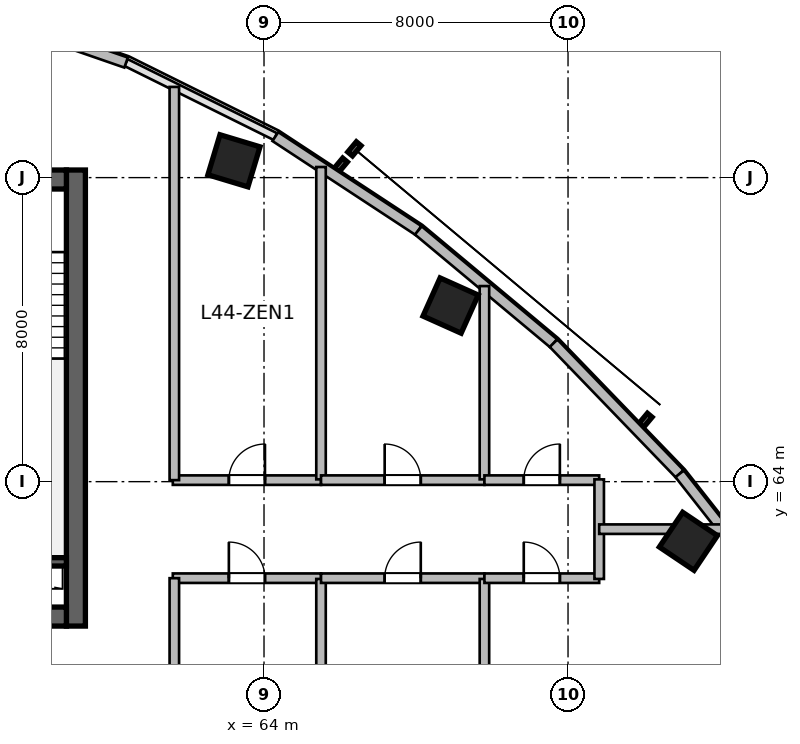
"""IFC4 building model, lengths in metres.
Left out: names, types, materials, properties, quantities, classifications, styles, units other than length and angle.
Written with IfcOpenShell. Run it as: python <this file> out.ifc"""

import sys

from ifc_helpers import new_model, si_unit, direction, frame, frame_2d, origin, origin_2d, place, context, subcontext, project, spatial, rectangle, extrude, source, transform, mapped, element, fill, save


model = new_model("IFC4")
c1 = context("Model", 3, precision=1e-05, world=origin(), true_north=direction((0.0, 1.0)))
c2 = subcontext(c1, "Body", "Model", "MODEL_VIEW")
j1 = project(units=[si_unit("LENGTHUNIT", "METRE"), si_unit("PLANEANGLEUNIT", "RADIAN")], contexts=[c1])
p1 = place(None, origin())
s1 = spatial("IfcSite", under=j1, at=p1, CompositionType="ELEMENT")
p2 = place(p1, origin())
s2 = spatial("IfcBuilding", under=s1, at=p2, CompositionType="ELEMENT")
p3 = place(p2, frame((0.0, 0.0, 181.8)))
s3 = spatial("IfcBuildingStorey", under=s2, at=p3, CompositionType="ELEMENT", Elevation=181.8)
m1 = source(origin(), c2, "Body", "SweptSolid", [
    extrude(rectangle(XDim=12.0, YDim=0.5, at=frame_2d((6.0, 0.0))), origin(), (0.0, 0.0, 1.0), 3.9),
])
p4 = place(p3, frame((59.05, 60.2, 0.0), z_axis=(0.0, 0.0, 1.0), x_axis=(0.0, 1.0, 0.0)))
e1 = element("IfcWall", 1, at=p4, inside=s3, PredefinedType="SHEAR", context=c2, shape_type="MappedRepresentation", body=[
    mapped(m1, transform((0.0, 0.0, 0.0), scale=1.0)),
])
m2 = source(origin(), c2, "Body", "SweptSolid", [
    extrude(rectangle(XDim=21.6, YDim=0.5, at=frame_2d((10.8, 0.0))), origin(), (0.0, 0.0, 1.0), 3.9),
])
p5 = place(p3, frame((37.2, 60.45, 0.0), z_axis=(0.0, 0.0, 1.0), x_axis=(1.0, 0.0, 0.0)))
e2 = element("IfcWall", 2, at=p5, inside=s3, PredefinedType="SHEAR", context=c2, shape_type="MappedRepresentation", body=[
    mapped(m2, transform((0.0, 0.0, 0.0), scale=1.0)),
])
p6 = place(p5, frame((1.1, 0.0, 0.0)))
e3 = element("IfcOpeningElement", 3, at=p6, cuts=e2, PredefinedType="OPENING", context=c2, shape_type="SweptSolid", body=[
    extrude(rectangle(XDim=1.15, YDim=2.15, at=frame_2d((0.575, 1.075))), frame((0.0, 0.26, 0.0), z_axis=(0.0, -1.0, 0.0), x_axis=(1.0, 0.0, 0.0)), (0.0, 0.0, 1.0), 0.52),
])
p7 = place(p5, frame((19.5, 0.0, 0.0)))
e4 = element("IfcOpeningElement", 4, at=p7, cuts=e2, PredefinedType="OPENING", context=c2, shape_type="SweptSolid", body=[
    extrude(rectangle(XDim=0.9, YDim=2.1, at=frame_2d((0.45, 1.05))), frame((0.0, 0.26, 0.0), z_axis=(0.0, -1.0, 0.0), x_axis=(1.0, 0.0, 0.0)), (0.0, 0.0, 1.0), 0.52),
])
p8 = place(p5, frame((12.02, 0.0, 0.0)))
e5 = element("IfcOpeningElement", 5, at=p8, cuts=e2, PredefinedType="OPENING", context=c2, shape_type="SweptSolid", body=[
    extrude(rectangle(XDim=1.6, YDim=2.15, at=frame_2d((0.8, 1.075))), frame((0.0, 0.26, 0.0), z_axis=(0.0, -1.0, 0.0), x_axis=(1.0, 0.0, 0.0)), (0.0, 0.0, 1.0), 0.52),
])
p9 = place(p3, frame((37.2, 71.95, 0.0), z_axis=(0.0, 0.0, 1.0), x_axis=(1.0, 0.0, 0.0)))
e6 = element("IfcWall", 6, at=p9, inside=s3, PredefinedType="SHEAR", context=c2, shape_type="MappedRepresentation", body=[
    mapped(m2, transform((0.0, 0.0, 0.0), scale=1.0)),
])
p10 = place(p9, frame((1.2, 0.0, 0.0)))
e7 = element("IfcOpeningElement", 7, at=p10, cuts=e6, PredefinedType="OPENING", context=c2, shape_type="SweptSolid", body=[
    extrude(rectangle(XDim=0.9, YDim=2.1, at=frame_2d((0.45, 1.05))), frame((0.0, 0.26, 0.0), z_axis=(0.0, -1.0, 0.0), x_axis=(1.0, 0.0, 0.0)), (0.0, 0.0, 1.0), 0.52),
])
p11 = place(p9, frame((14.7, 0.0, 0.0)))
e8 = element("IfcOpeningElement", 8, at=p11, cuts=e6, PredefinedType="OPENING", context=c2, shape_type="SweptSolid", body=[
    extrude(rectangle(XDim=1.2, YDim=2.15, at=frame_2d((0.6, 1.075))), frame((0.0, 0.26, 0.0), z_axis=(0.0, -1.0, 0.0), x_axis=(1.0, 0.0, 0.0)), (0.0, 0.0, 1.0), 0.52),
])
p12 = place(p9, frame((4.15, 0.0, 0.0)))
e9 = element("IfcOpeningElement", 9, at=p12, cuts=e6, PredefinedType="OPENING", context=c2, shape_type="SweptSolid", body=[
    extrude(rectangle(XDim=1.3, YDim=2.15, at=frame_2d((0.65, 1.075))), frame((0.0, 0.26, 0.0), z_axis=(0.0, -1.0, 0.0), x_axis=(1.0, 0.0, 0.0)), (0.0, 0.0, 1.0), 0.52),
])
p13 = place(p9, frame((7.25, 0.0, 0.0)))
e10 = element("IfcOpeningElement", 10, at=p13, cuts=e6, PredefinedType="OPENING", context=c2, shape_type="SweptSolid", body=[
    extrude(rectangle(XDim=0.9, YDim=2.1, at=frame_2d((0.45, 1.05))), frame((0.0, 0.26, 0.0), z_axis=(0.0, -1.0, 0.0), x_axis=(1.0, 0.0, 0.0)), (0.0, 0.0, 1.0), 0.52),
])
m3 = source(origin(), c2, "Body", "SweptSolid", [
    extrude(rectangle(XDim=3.27, YDim=0.22, at=frame_2d((1.635, 0.0))), origin(), (0.0, 0.0, 1.0), 3.9),
])
p14 = place(p3, frame((55.53, 61.89, 0.0), z_axis=(0.0, 0.0, 1.0), x_axis=(1.0, 0.0, 0.0)))
e11 = element("IfcWall", 11, at=p14, inside=s3, PredefinedType="SHEAR", context=c2, shape_type="MappedRepresentation", body=[
    mapped(m3, transform((0.0, 0.0, 0.0), scale=1.0)),
])
m4 = source(origin(), c2, "Body", "SweptSolid", [
    extrude(rectangle(XDim=1.1, YDim=1.1, at=origin_2d()), origin(), (0.0, 0.0, 1.0), 3.9),
])
for number, where, z_axis, x_axis in (
    (12, (63.209, 72.442, 0.0), (0.0, 0.0, 1.0), (0.289, 0.957, 0.0)),
    (13, (68.91, 68.633, 0.0), (0.0, 0.0, 1.0), (0.409, 0.912, 0.0)),
    (14, (75.167, 62.43, 0.0), (0.0, 0.0, 1.0), (0.558, 0.83, 0.0)),
):
    element("IfcColumn", number, at=place(p3, frame(where, z_axis=z_axis, x_axis=x_axis)), inside=s3, PredefinedType="COLUMN", context=c2, shape_type="MappedRepresentation", body=[
        mapped(m4, transform((0.0, 0.0, 0.0), scale=1.0)),
    ])
m5 = source(origin(), c2, "Body", "SweptSolid", [
    extrude(rectangle(XDim=4.29, YDim=0.28, at=frame_2d((2.145, 0.0))), origin(), (0.0, 0.0, 1.0), 3.65),
])
p15 = place(p3, frame((56.317, 76.431, 0.0), z_axis=(0.0, 0.0, 1.0), x_axis=(0.944883859218, -0.3274057003, 0.0)))
e15 = element("IfcWall", 15, at=p15, inside=s3, PredefinedType="SOLIDWALL", context=c2, shape_type="MappedRepresentation", body=[
    mapped(m5, transform((0.0, 0.0, 0.0), scale=1.0)),
])
m6 = source(origin(), c2, "Body", "SweptSolid", [
    extrude(rectangle(XDim=4.501, YDim=0.28, at=frame_2d((2.25, 0.0))), origin(), (0.0, 0.0, 1.0), 3.65),
])
p16 = place(p3, frame((64.298, 73.08, 0.0), z_axis=(0.0, 0.0, 1.0), x_axis=(0.835984920737, -0.548752414391, 0.0)))
e16 = element("IfcWall", 16, at=p16, inside=s3, PredefinedType="SOLIDWALL", context=c2, shape_type="MappedRepresentation", body=[
    mapped(m6, transform((0.0, 0.0, 0.0), scale=1.0)),
])
m7 = source(origin(), c2, "Body", "SweptSolid", [
    extrude(rectangle(XDim=4.634, YDim=0.28, at=frame_2d((2.317, 0.0))), origin(), (0.0, 0.0, 1.0), 3.65),
])
p17 = place(p3, frame((68.061, 70.61, 0.0), z_axis=(0.0, 0.0, 1.0), x_axis=(0.767910229096, -0.640557475993, 0.0)))
e17 = element("IfcWall", 17, at=p17, inside=s3, PredefinedType="SOLIDWALL", context=c2, shape_type="MappedRepresentation", body=[
    mapped(m7, transform((0.0, 0.0, 0.0), scale=1.0)),
])
m8 = source(origin(), c2, "Body", "SweptSolid", [
    extrude(rectangle(XDim=4.776, YDim=0.28, at=frame_2d((2.388, 0.0))), origin(), (0.0, 0.0, 1.0), 3.65),
])
p18 = place(p3, frame((71.619, 67.642, 0.0), z_axis=(0.0, 0.0, 1.0), x_axis=(0.694601811851, -0.719394414055, 0.0)))
e18 = element("IfcWall", 18, at=p18, inside=s3, PredefinedType="SOLIDWALL", context=c2, shape_type="MappedRepresentation", body=[
    mapped(m8, transform((0.0, 0.0, 0.0), scale=1.0)),
])
m9 = source(origin(), c2, "Body", "SweptSolid", [
    extrude(rectangle(XDim=4.922, YDim=0.28, at=frame_2d((2.461, 0.0))), origin(), (0.0, 0.0, 1.0), 3.65),
])
p19 = place(p3, frame((74.936, 64.206, 0.0), z_axis=(0.0, 0.0, 1.0), x_axis=(0.61817639101, -0.786039407153, 0.0)))
e19 = element("IfcWall", 19, at=p19, inside=s3, PredefinedType="SOLIDWALL", context=c2, shape_type="MappedRepresentation", body=[
    mapped(m9, transform((0.0, 0.0, 0.0), scale=1.0)),
])
m10 = source(origin(), c2, "Body", "SweptSolid", [
    extrude(rectangle(XDim=3.9, YDim=0.25, at=frame_2d((1.95, 0.0))), origin(), (0.0, 0.0, 1.0), 3.65),
])
p20 = place(p3, frame((61.6, 64.04, 0.0), z_axis=(0.0, 0.0, 1.0), x_axis=(1.0, 0.0, 0.0)))
e20 = element("IfcWall", 20, at=p20, inside=s3, PredefinedType="PARTITIONING", context=c2, shape_type="MappedRepresentation", body=[
    mapped(m10, transform((0.0, 0.0, 0.0), scale=1.0)),
])
p21 = place(p20, frame((1.475, 0.0, 0.0)))
e21 = element("IfcOpeningElement", 21, at=p21, cuts=e20, PredefinedType="OPENING", context=c2, shape_type="SweptSolid", body=[
    extrude(rectangle(XDim=0.95, YDim=2.1, at=frame_2d((0.475, 1.05))), frame((0.0, 0.135, 0.0), z_axis=(0.0, -1.0, 0.0), x_axis=(1.0, 0.0, 0.0)), (0.0, 0.0, 1.0), 0.27),
])
m11 = source(origin(), c2, "Body", "SweptSolid", [
    extrude(rectangle(XDim=8.219, YDim=0.25, at=frame_2d((4.109, 0.0))), origin(), (0.0, 0.0, 1.0), 3.65),
])
p22 = place(p3, frame((65.5, 64.06, 0.0), z_axis=(0.0, 0.0, 1.0), x_axis=(0.0, 1.0, 0.0)))
e22 = element("IfcWall", 22, at=p22, inside=s3, PredefinedType="PARTITIONING", context=c2, shape_type="MappedRepresentation", body=[
    mapped(m11, transform((0.0, 0.0, 0.0), scale=1.0)),
])
m12 = source(origin(), c2, "Body", "SweptSolid", [
    extrude(rectangle(XDim=4.3, YDim=0.25, at=frame_2d((2.15, 0.0))), origin(), (0.0, 0.0, 1.0), 3.65),
])
p23 = place(p3, frame((65.5, 64.04, 0.0), z_axis=(0.0, 0.0, 1.0), x_axis=(1.0, 0.0, 0.0)))
e23 = element("IfcWall", 23, at=p23, inside=s3, PredefinedType="PARTITIONING", context=c2, shape_type="MappedRepresentation", body=[
    mapped(m12, transform((0.0, 0.0, 0.0), scale=1.0)),
])
p24 = place(p23, frame((1.675, 0.0, 0.0)))
e24 = element("IfcOpeningElement", 24, at=p24, cuts=e23, PredefinedType="OPENING", context=c2, shape_type="SweptSolid", body=[
    extrude(rectangle(XDim=0.95, YDim=2.1, at=frame_2d((0.475, 1.05))), frame((0.0, 0.135, 0.0), z_axis=(0.0, -1.0, 0.0), x_axis=(1.0, 0.0, 0.0)), (0.0, 0.0, 1.0), 0.27),
])
m13 = source(origin(), c2, "Body", "SweptSolid", [
    extrude(rectangle(XDim=5.086, YDim=0.25, at=frame_2d((2.543, 0.0))), origin(), (0.0, 0.0, 1.0), 3.65),
])
p25 = place(p3, frame((69.8, 64.06, 0.0), z_axis=(0.0, 0.0, 1.0), x_axis=(0.0, 1.0, 0.0)))
e25 = element("IfcWall", 25, at=p25, inside=s3, PredefinedType="PARTITIONING", context=c2, shape_type="MappedRepresentation", body=[
    mapped(m13, transform((0.0, 0.0, 0.0), scale=1.0)),
])
m14 = source(origin(), c2, "Body", "SweptSolid", [
    extrude(rectangle(XDim=3.02, YDim=0.25, at=frame_2d((1.51, 0.0))), origin(), (0.0, 0.0, 1.0), 3.65),
])
p26 = place(p3, frame((69.8, 64.04, 0.0), z_axis=(0.0, 0.0, 1.0), x_axis=(1.0, 0.0, 0.0)))
e26 = element("IfcWall", 26, at=p26, inside=s3, PredefinedType="PARTITIONING", context=c2, shape_type="MappedRepresentation", body=[
    mapped(m14, transform((0.0, 0.0, 0.0), scale=1.0)),
])
p27 = place(p26, frame((1.035, 0.0, 0.0)))
e27 = element("IfcOpeningElement", 27, at=p27, cuts=e26, PredefinedType="OPENING", context=c2, shape_type="SweptSolid", body=[
    extrude(rectangle(XDim=0.95, YDim=2.1, at=frame_2d((0.475, 1.05))), frame((0.0, 0.135, 0.0), z_axis=(0.0, -1.0, 0.0), x_axis=(1.0, 0.0, 0.0)), (0.0, 0.0, 1.0), 0.27),
])
p28 = place(p3, frame((61.6, 61.46, 0.0), z_axis=(0.0, 0.0, 1.0), x_axis=(1.0, 0.0, 0.0)))
e28 = element("IfcWall", 28, at=p28, inside=s3, PredefinedType="PARTITIONING", context=c2, shape_type="MappedRepresentation", body=[
    mapped(m10, transform((0.0, 0.0, 0.0), scale=1.0)),
])
p29 = place(p28, frame((1.475, 0.0, 0.0)))
e29 = element("IfcOpeningElement", 29, at=p29, cuts=e28, PredefinedType="OPENING", context=c2, shape_type="SweptSolid", body=[
    extrude(rectangle(XDim=0.95, YDim=2.1, at=frame_2d((0.475, 1.05))), frame((0.0, 0.135, 0.0), z_axis=(0.0, -1.0, 0.0), x_axis=(1.0, 0.0, 0.0)), (0.0, 0.0, 1.0), 0.27),
])
m15 = source(origin(), c2, "Body", "SweptSolid", [
    extrude(rectangle(XDim=16.369, YDim=0.25, at=frame_2d((8.185, 0.0))), origin(), (0.0, 0.0, 1.0), 2.942),
])
p30 = place(p3, frame((65.5, 45.071, 0.0), z_axis=(0.0, 0.0, 1.0), x_axis=(0.0, 1.0, 0.0)))
e30 = element("IfcWall", 30, at=p30, inside=s3, PredefinedType="PARTITIONING", context=c2, shape_type="MappedRepresentation", body=[
    mapped(m15, transform((0.0, 0.0, 0.0), scale=1.0)),
])
p31 = place(p3, frame((65.5, 61.46, 0.0), z_axis=(0.0, 0.0, 1.0), x_axis=(1.0, 0.0, 0.0)))
e31 = element("IfcWall", 31, at=p31, inside=s3, PredefinedType="PARTITIONING", context=c2, shape_type="MappedRepresentation", body=[
    mapped(m12, transform((0.0, 0.0, 0.0), scale=1.0)),
])
p32 = place(p31, frame((1.675, 0.0, 0.0)))
e32 = element("IfcOpeningElement", 32, at=p32, cuts=e31, PredefinedType="OPENING", context=c2, shape_type="SweptSolid", body=[
    extrude(rectangle(XDim=0.95, YDim=2.1, at=frame_2d((0.475, 1.05))), frame((0.0, 0.135, 0.0), z_axis=(0.0, -1.0, 0.0), x_axis=(1.0, 0.0, 0.0)), (0.0, 0.0, 1.0), 0.27),
])
m16 = source(origin(), c2, "Body", "SweptSolid", [
    extrude(rectangle(XDim=22.806, YDim=0.25, at=frame_2d((11.403, 0.0))), origin(), (0.0, 0.0, 1.0), 2.942),
])
p33 = place(p3, frame((69.8, 38.634, 0.0), z_axis=(0.0, 0.0, 1.0), x_axis=(0.0, 1.0, 0.0)))
e33 = element("IfcWall", 33, at=p33, inside=s3, PredefinedType="PARTITIONING", context=c2, shape_type="MappedRepresentation", body=[
    mapped(m16, transform((0.0, 0.0, 0.0), scale=1.0)),
])
p34 = place(p3, frame((69.8, 61.46, 0.0), z_axis=(0.0, 0.0, 1.0), x_axis=(1.0, 0.0, 0.0)))
e34 = element("IfcWall", 34, at=p34, inside=s3, PredefinedType="PARTITIONING", context=c2, shape_type="MappedRepresentation", body=[
    mapped(m14, transform((0.0, 0.0, 0.0), scale=1.0)),
])
p35 = place(p34, frame((1.035, 0.0, 0.0)))
e35 = element("IfcOpeningElement", 35, at=p35, cuts=e34, PredefinedType="OPENING", context=c2, shape_type="SweptSolid", body=[
    extrude(rectangle(XDim=0.95, YDim=2.1, at=frame_2d((0.475, 1.05))), frame((0.0, 0.135, 0.0), z_axis=(0.0, -1.0, 0.0), x_axis=(1.0, 0.0, 0.0)), (0.0, 0.0, 1.0), 0.27),
])
m17 = source(origin(), c2, "Body", "SweptSolid", [
    extrude(rectangle(XDim=12.126, YDim=0.25, at=frame_2d((6.063, 0.0))), origin(), (0.0, 0.0, 1.0), 2.942),
])
p36 = place(p3, frame((61.64, 49.334, 0.0), z_axis=(0.0, 0.0, 1.0), x_axis=(0.0, 1.0, 0.0)))
e36 = element("IfcWall", 36, at=p36, inside=s3, PredefinedType="PARTITIONING", context=c2, shape_type="MappedRepresentation", body=[
    mapped(m17, transform((0.0, 0.0, 0.0), scale=1.0)),
])
m18 = source(origin(), c2, "Body", "SweptSolid", [
    extrude(rectangle(XDim=10.346, YDim=0.25, at=frame_2d((5.173, 0.0))), origin(), (0.0, 0.0, 1.0), 3.65),
])
p37 = place(p3, frame((61.64, 64.04, 0.0), z_axis=(0.0, 0.0, 1.0), x_axis=(0.0, 1.0, 0.0)))
e37 = element("IfcWall", 37, at=p37, inside=s3, PredefinedType="PARTITIONING", context=c2, shape_type="MappedRepresentation", body=[
    mapped(m18, transform((0.0, 0.0, 0.0), scale=1.0)),
])
m19 = source(origin(), c2, "Body", "SweptSolid", [
    extrude(rectangle(XDim=2.62, YDim=0.25, at=frame_2d((1.31, 0.0))), origin(), (0.0, 0.0, 1.0), 3.093),
])
p38 = place(p3, frame((72.82, 61.44, 0.0), z_axis=(0.0, 0.0, 1.0), x_axis=(0.0, 1.0, 0.0)))
e38 = element("IfcWall", 38, at=p38, inside=s3, PredefinedType="PARTITIONING", context=c2, shape_type="MappedRepresentation", body=[
    mapped(m19, transform((0.0, 0.0, 0.0), scale=1.0)),
])
m20 = source(origin(), c2, "Body", "SweptSolid", [
    extrude(rectangle(XDim=3.249, YDim=0.25, at=frame_2d((1.625, 0.0))), origin(), (0.0, 0.0, 1.0), 3.65),
])
p39 = place(p3, frame((72.82, 62.75, 0.0), z_axis=(0.0, 0.0, 1.0), x_axis=(1.0, 0.0, 0.0)))
e39 = element("IfcWall", 39, at=p39, inside=s3, PredefinedType="PARTITIONING", context=c2, shape_type="MappedRepresentation", body=[
    mapped(m20, transform((0.0, 0.0, 0.0), scale=1.0)),
])
m21 = source(origin(), c2, "Body", "SweptSolid", [
    extrude(rectangle(XDim=0.95, YDim=2.1, at=frame_2d((0.475, 1.05))), frame((0.0, 0.025, 0.0), z_axis=(0.0, -1.0, 0.0), x_axis=(1.0, 0.0, 0.0)), (0.0, 0.0, 1.0), 0.05),
])
p40 = place(p21, origin())
e40 = element("IfcDoor", 40, at=p40, inside=s3, OperationType="SINGLE_SWING_RIGHT", PredefinedType="DOOR", context=c2, shape_type="MappedRepresentation", body=[
    mapped(m21, transform((0.0, 0.0, 0.0), scale=1.0)),
])
fill(e21, e40)
p41 = place(p24, origin())
e41 = element("IfcDoor", 41, at=p41, inside=s3, OperationType="SINGLE_SWING_LEFT", PredefinedType="DOOR", context=c2, shape_type="MappedRepresentation", body=[
    mapped(m21, transform((0.0, 0.0, 0.0), scale=1.0)),
])
fill(e24, e41)
p42 = place(p27, origin())
e42 = element("IfcDoor", 42, at=p42, inside=s3, OperationType="SINGLE_SWING_RIGHT", PredefinedType="DOOR", context=c2, shape_type="MappedRepresentation", body=[
    mapped(m21, transform((0.0, 0.0, 0.0), scale=1.0)),
])
fill(e27, e42)
p43 = place(p29, origin())
e43 = element("IfcDoor", 43, at=p43, inside=s3, OperationType="SINGLE_SWING_LEFT", PredefinedType="DOOR", context=c2, shape_type="MappedRepresentation", body=[
    mapped(m21, transform((0.0, 0.0, 0.0), scale=1.0)),
])
fill(e29, e43)
p44 = place(p32, origin())
e44 = element("IfcDoor", 44, at=p44, inside=s3, OperationType="SINGLE_SWING_RIGHT", PredefinedType="DOOR", context=c2, shape_type="MappedRepresentation", body=[
    mapped(m21, transform((0.0, 0.0, 0.0), scale=1.0)),
])
fill(e32, e44)
p45 = place(p35, origin())
e45 = element("IfcDoor", 45, at=p45, inside=s3, OperationType="SINGLE_SWING_LEFT", PredefinedType="DOOR", context=c2, shape_type="MappedRepresentation", body=[
    mapped(m21, transform((0.0, 0.0, 0.0), scale=1.0)),
])
fill(e35, e45)
save(model, sys.argv[1])
